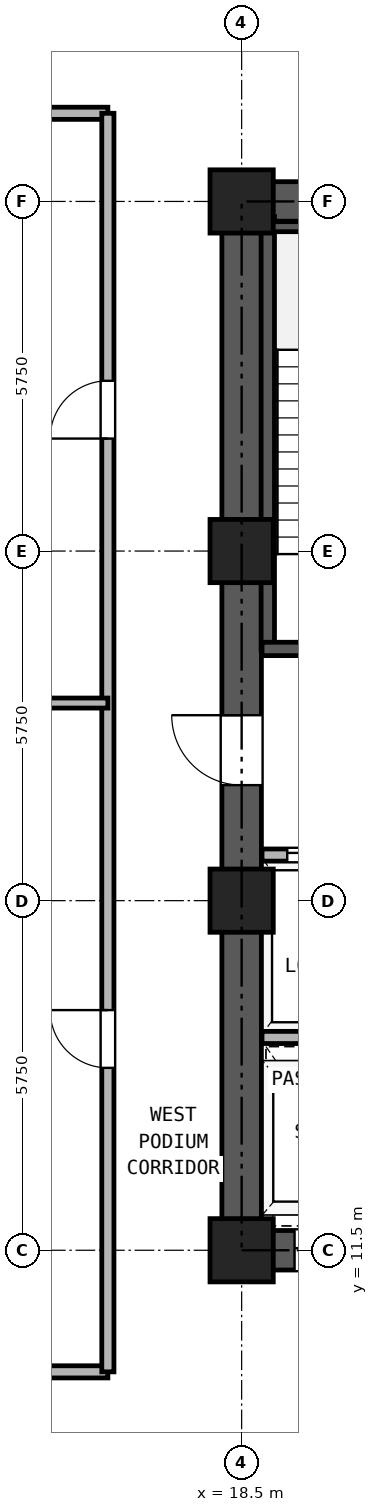
"""IFC4 building model, lengths in metres.
Left out: names, types, materials, properties, quantities, classifications, styles, units other than length and angle.
Written with IfcOpenShell. Run it as: python <this file> out.ifc"""

import sys

from ifc_helpers import new_model, si_unit, direction, frame, frame_2d, origin, origin_2d, place, context, subcontext, project, spatial, rectangle, hollow_rectangle, extrude, source, transform, mapped, element, fill, save


model = new_model("IFC4")
c1 = context("Model", 3, precision=1e-05, world=origin(), true_north=direction((0.0, 1.0)))
c2 = subcontext(c1, "Body", "Model", "MODEL_VIEW")
j1 = project(units=[si_unit("LENGTHUNIT", "METRE"), si_unit("PLANEANGLEUNIT", "RADIAN")], contexts=[c1])
p1 = place(None, origin())
s1 = spatial("IfcSite", under=j1, at=p1, CompositionType="ELEMENT")
p2 = place(p1, origin())
s2 = spatial("IfcBuilding", under=s1, at=p2, CompositionType="ELEMENT")
p3 = place(p2, frame((0.0, 0.0, 18.0)))
s3 = spatial("IfcBuildingStorey", under=s2, at=p3, CompositionType="ELEMENT", Elevation=18.0)
m1 = source(origin(), c2, "Body", "SweptSolid", [
    extrude(hollow_rectangle(XDim=1.04, YDim=1.04, WallThickness=0.065, at=origin_2d()), origin(), (0.0, 0.0, 1.0), 4.14),
])
for number, where, z_axis, x_axis in (
    (1, (18.5, 11.5, 0.0), (0.0, 0.0, 1.0), (1.0, 0.0, 0.0)),
    (2, (18.5, 17.25, 0.0), (0.0, 0.0, 1.0), (1.0, 0.0, 0.0)),
    (3, (18.5, 23.0, 0.0), (0.0, 0.0, 1.0), (1.0, 0.0, 0.0)),
    (4, (18.5, 28.75, 0.0), (0.0, 0.0, 1.0), (1.0, 0.0, 0.0)),
):
    element("IfcColumn", number, at=place(p3, frame(where, z_axis=z_axis, x_axis=x_axis)), inside=s3, PredefinedType="COLUMN", context=c2, shape_type="MappedRepresentation", body=[
        mapped(m1, transform((0.0, 0.0, 0.0), x_axis=(1.0, 0.0, 0.0), y_axis=(0.0, 1.0, 0.0), z_axis=(0.0, 0.0, 1.0), scale=1.0)),
    ])
p4 = place(p3, frame((18.175, 11.5, 0.0), z_axis=(0.0, 0.0, 1.0), x_axis=(1.0, 0.0, 0.0)))
e5 = element("IfcWall", 5, at=p4, inside=s3, PredefinedType="SHEAR", context=c2, shape_type="SweptSolid", body=[
    extrude(rectangle(XDim=10.65, YDim=0.65, at=frame_2d((5.325, 0.0))), origin(), (0.0, 0.0, 1.0), 4.14),
])
p5 = place(p4, frame((1.195, 0.0, 0.0)))
e6 = element("IfcOpeningElement", 6, at=p5, cuts=e5, PredefinedType="OPENING", context=c2, shape_type="SweptSolid", body=[
    extrude(rectangle(XDim=1.1, YDim=2.25, at=frame_2d((0.55, 1.125))), frame((0.0, 0.335, 0.0), z_axis=(0.0, -1.0, 0.0), x_axis=(1.0, 0.0, 0.0)), (0.0, 0.0, 1.0), 0.67),
])
p6 = place(p4, frame((3.495, 0.0, 0.0)))
e7 = element("IfcOpeningElement", 7, at=p6, cuts=e5, PredefinedType="OPENING", context=c2, shape_type="SweptSolid", body=[
    extrude(rectangle(XDim=1.1, YDim=2.25, at=frame_2d((0.55, 1.125))), frame((0.0, 0.335, 0.0), z_axis=(0.0, -1.0, 0.0), x_axis=(1.0, 0.0, 0.0)), (0.0, 0.0, 1.0), 0.67),
])
p7 = place(p4, frame((5.925, 0.0, 0.0)))
e8 = element("IfcOpeningElement", 8, at=p7, cuts=e5, PredefinedType="OPENING", context=c2, shape_type="SweptSolid", body=[
    extrude(rectangle(XDim=1.1, YDim=2.25, at=frame_2d((0.55, 1.125))), frame((0.0, 0.335, 0.0), z_axis=(0.0, -1.0, 0.0), x_axis=(1.0, 0.0, 0.0)), (0.0, 0.0, 1.0), 0.67),
])
p8 = place(p4, frame((8.325, 0.0, 0.0)))
e9 = element("IfcOpeningElement", 9, at=p8, cuts=e5, PredefinedType="OPENING", context=c2, shape_type="SweptSolid", body=[
    extrude(rectangle(XDim=1.1, YDim=2.25, at=frame_2d((0.55, 1.125))), frame((0.0, 0.335, 0.0), z_axis=(0.0, -1.0, 0.0), x_axis=(1.0, 0.0, 0.0)), (0.0, 0.0, 1.0), 0.67),
])
p9 = place(p3, frame((18.175, 28.75, 0.0), z_axis=(0.0, 0.0, 1.0), x_axis=(1.0, 0.0, 0.0)))
e10 = element("IfcWall", 10, at=p9, inside=s3, PredefinedType="SHEAR", context=c2, shape_type="SweptSolid", body=[
    extrude(rectangle(XDim=10.65, YDim=0.65, at=frame_2d((5.325, 0.0))), origin(), (0.0, 0.0, 1.0), 4.14),
])
p10 = place(p9, frame((4.205, 0.0, 0.0)))
e11 = element("IfcOpeningElement", 11, at=p10, cuts=e10, PredefinedType="OPENING", context=c2, shape_type="SweptSolid", body=[
    extrude(rectangle(XDim=0.9, YDim=2.05, at=frame_2d((0.45, 1.025))), frame((0.0, 0.335, 0.0), z_axis=(0.0, -1.0, 0.0), x_axis=(1.0, 0.0, 0.0)), (0.0, 0.0, 1.0), 0.67),
])
p11 = place(p9, frame((5.745, 0.0, 0.0)))
e12 = element("IfcOpeningElement", 12, at=p11, cuts=e10, PredefinedType="OPENING", context=c2, shape_type="SweptSolid", body=[
    extrude(rectangle(XDim=0.9, YDim=2.05, at=frame_2d((0.45, 1.025))), frame((0.0, 0.335, 0.0), z_axis=(0.0, -1.0, 0.0), x_axis=(1.0, 0.0, 0.0)), (0.0, 0.0, 1.0), 0.67),
])
p12 = place(p3, frame((18.5, 11.825, 0.0), z_axis=(0.0, 0.0, 1.0), x_axis=(0.0, 1.0, 0.0)))
e13 = element("IfcWall", 13, at=p12, inside=s3, PredefinedType="SHEAR", context=c2, shape_type="SweptSolid", body=[
    extrude(rectangle(XDim=16.6, YDim=0.65, at=frame_2d((8.3, 0.0))), origin(), (0.0, 0.0, 1.0), 4.14),
])
p13 = place(p12, frame((7.325, 0.0, 0.0)))
e14 = element("IfcOpeningElement", 14, at=p13, cuts=e13, PredefinedType="OPENING", context=c2, shape_type="SweptSolid", body=[
    extrude(rectangle(XDim=1.15, YDim=2.2, at=frame_2d((0.575, 1.1))), frame((0.0, 0.335, 0.0), z_axis=(0.0, -1.0, 0.0), x_axis=(1.0, 0.0, 0.0)), (0.0, 0.0, 1.0), 0.67),
])
p14 = place(p3, frame((18.93, 21.39, 0.0), z_axis=(0.0, 0.0, 1.0), x_axis=(0.0, 1.0, 0.0)))
e15 = element("IfcWall", 15, at=p14, inside=s3, PredefinedType="SOLIDWALL", context=c2, shape_type="SweptSolid", body=[
    extrude(rectangle(XDim=7.11, YDim=0.22, at=frame_2d((3.555, 0.0))), origin(), (0.0, 0.0, 1.0), 4.14),
])
p15 = place(p3, frame((18.835, 28.335, 0.0), z_axis=(0.0, 0.0, 1.0), x_axis=(1.0, 0.0, 0.0)))
e16 = element("IfcWall", 16, at=p15, inside=s3, PredefinedType="PARTITIONING", context=c2, shape_type="SweptSolid", body=[
    extrude(rectangle(XDim=3.275, YDim=0.165, at=frame_2d((1.638, 0.0))), origin(), (0.0, 0.0, 1.0), 4.14),
])
p16 = place(p3, frame((18.835, 21.39, 0.0), z_axis=(0.0, 0.0, 1.0), x_axis=(1.0, 0.0, 0.0)))
e17 = element("IfcWall", 17, at=p16, inside=s3, PredefinedType="SOLIDWALL", context=c2, shape_type="SweptSolid", body=[
    extrude(rectangle(XDim=6.295, YDim=0.22, at=frame_2d((3.147, 0.0))), origin(), (0.0, 0.0, 1.0), 4.14),
])
p17 = place(p16, frame((1.015, 0.0, 0.0)))
e18 = element("IfcOpeningElement", 18, at=p17, cuts=e17, PredefinedType="OPENING", context=c2, shape_type="SweptSolid", body=[
    extrude(rectangle(XDim=1.15, YDim=2.2, at=frame_2d((0.575, 1.1))), frame((0.0, 0.12, 0.0), z_axis=(0.0, -1.0, 0.0), x_axis=(1.0, 0.0, 0.0)), (0.0, 0.0, 1.0), 0.24),
])
p18 = place(p16, frame((4.745, 0.0, 0.0)))
e19 = element("IfcOpeningElement", 19, at=p18, cuts=e17, PredefinedType="OPENING", context=c2, shape_type="SweptSolid", body=[
    extrude(rectangle(XDim=1.1, YDim=2.25, at=frame_2d((0.55, 1.125))), frame((0.0, 0.12, 0.0), z_axis=(0.0, -1.0, 0.0), x_axis=(1.0, 0.0, 0.0)), (0.0, 0.0, 1.0), 0.24),
])
p19 = place(p3, frame((18.835, 18.0, 0.0), z_axis=(0.0, 0.0, 1.0), x_axis=(1.0, 0.0, 0.0)))
e20 = element("IfcWall", 20, at=p19, inside=s3, PredefinedType="PARTITIONING", context=c2, shape_type="SweptSolid", body=[
    extrude(rectangle(XDim=9.33, YDim=0.2, at=frame_2d((4.665, 0.0))), origin(), (0.0, 0.0, 1.0), 4.14),
])
p20 = place(p19, frame((0.415, 0.0, 0.0)))
e21 = element("IfcOpeningElement", 21, at=p20, cuts=e20, PredefinedType="OPENING", context=c2, shape_type="SweptSolid", body=[
    extrude(rectangle(XDim=1.3, YDim=2.3, at=frame_2d((0.65, 1.15))), frame((0.0, 0.11, 0.0), z_axis=(0.0, -1.0, 0.0), x_axis=(1.0, 0.0, 0.0)), (0.0, 0.0, 1.0), 0.22),
])
p21 = place(p19, frame((2.515, 0.0, 0.0)))
e22 = element("IfcOpeningElement", 22, at=p21, cuts=e20, PredefinedType="OPENING", context=c2, shape_type="SweptSolid", body=[
    extrude(rectangle(XDim=1.3, YDim=2.3, at=frame_2d((0.65, 1.15))), frame((0.0, 0.11, 0.0), z_axis=(0.0, -1.0, 0.0), x_axis=(1.0, 0.0, 0.0)), (0.0, 0.0, 1.0), 0.22),
])
p22 = place(p19, frame((7.015, 0.0, 0.0)))
e23 = element("IfcOpeningElement", 23, at=p22, cuts=e20, PredefinedType="OPENING", context=c2, shape_type="SweptSolid", body=[
    extrude(rectangle(XDim=1.0, YDim=2.15, at=frame_2d((0.5, 1.075))), frame((0.0, 0.11, 0.0), z_axis=(0.0, -1.0, 0.0), x_axis=(1.0, 0.0, 0.0)), (0.0, 0.0, 1.0), 0.22),
])
p23 = place(p3, frame((18.835, 15.0, 0.0), z_axis=(0.0, 0.0, 1.0), x_axis=(1.0, 0.0, 0.0)))
e24 = element("IfcWall", 24, at=p23, inside=s3, PredefinedType="PARTITIONING", context=c2, shape_type="SweptSolid", body=[
    extrude(rectangle(XDim=9.33, YDim=0.2, at=frame_2d((4.665, 0.0))), origin(), (0.0, 0.0, 1.0), 4.14),
])
for number, where, z_axis, x_axis in (
    (25, (10.5, 9.5, 0.0), (0.0, 0.0, 1.0), (1.0, 0.0, 0.0)),
    (26, (10.5, 30.2, 0.0), (0.0, 0.0, 1.0), (1.0, 0.0, 0.0)),
):
    element("IfcWall", number, at=place(p3, frame(where, z_axis=z_axis, x_axis=x_axis)), inside=s3, PredefinedType="PARTITIONING", context=c2, shape_type="SweptSolid", body=[
        extrude(rectangle(XDim=5.8, YDim=0.2, at=frame_2d((2.9, 0.0))), origin(), (0.0, 0.0, 1.0), 4.14),
    ])
p24 = place(p3, frame((16.3, 9.5, 0.0), z_axis=(0.0, 0.0, 1.0), x_axis=(0.0, 1.0, 0.0)))
e27 = element("IfcWall", 27, at=p24, inside=s3, PredefinedType="PARTITIONING", context=c2, shape_type="SweptSolid", body=[
    extrude(rectangle(XDim=20.7, YDim=0.2, at=frame_2d((10.35, 0.0))), origin(), (0.0, 0.0, 1.0), 4.14),
])
p25 = place(p24, frame((5.0, 0.0, 0.0)))
e28 = element("IfcOpeningElement", 28, at=p25, cuts=e27, PredefinedType="OPENING", context=c2, shape_type="SweptSolid", body=[
    extrude(rectangle(XDim=0.95, YDim=2.15, at=frame_2d((0.475, 1.075))), frame((0.0, 0.11, 0.0), z_axis=(0.0, -1.0, 0.0), x_axis=(1.0, 0.0, 0.0)), (0.0, 0.0, 1.0), 0.22),
])
p26 = place(p24, frame((15.35, 0.0, 0.0)))
e29 = element("IfcOpeningElement", 29, at=p26, cuts=e27, PredefinedType="OPENING", context=c2, shape_type="SweptSolid", body=[
    extrude(rectangle(XDim=0.95, YDim=2.15, at=frame_2d((0.475, 1.075))), frame((0.0, 0.11, 0.0), z_axis=(0.0, -1.0, 0.0), x_axis=(1.0, 0.0, 0.0)), (0.0, 0.0, 1.0), 0.22),
])
p27 = place(p3, frame((0.25, 20.5, 0.0), z_axis=(0.0, 0.0, 1.0), x_axis=(1.0, 0.0, 0.0)))
e30 = element("IfcWall", 30, at=p27, inside=s3, PredefinedType="PARTITIONING", context=c2, shape_type="SweptSolid", body=[
    extrude(rectangle(XDim=16.05, YDim=0.165, at=frame_2d((8.025, 0.0))), origin(), (0.0, 0.0, 1.0), 4.14),
])
p28 = place(p20, origin())
e31 = element("IfcDoor", 31, at=p28, inside=s3, OperationType="DOUBLE_DOOR_SLIDING", PredefinedType="DOOR", context=c2, shape_type="SweptSolid", body=[
    extrude(rectangle(XDim=1.3, YDim=2.3, at=frame_2d((0.65, 1.15))), frame((0.0, 0.025, 0.0), z_axis=(0.0, -1.0, 0.0), x_axis=(1.0, 0.0, 0.0)), (0.0, 0.0, 1.0), 0.05),
])
fill(e21, e31)
p29 = place(p13, frame((1.15, 0.0, 0.0), z_axis=(0.0, 0.0, 1.0), x_axis=(-1.0, 0.0, 0.0)))
e32 = element("IfcDoor", 32, at=p29, inside=s3, OperationType="SINGLE_SWING_RIGHT", PredefinedType="DOOR", context=c2, shape_type="SweptSolid", body=[
    extrude(rectangle(XDim=1.15, YDim=2.2, at=frame_2d((0.575, 1.1))), frame((0.0, 0.025, 0.0), z_axis=(0.0, -1.0, 0.0), x_axis=(1.0, 0.0, 0.0)), (0.0, 0.0, 1.0), 0.05),
])
fill(e14, e32)
p30 = place(p5, frame((1.1, 0.0, 0.0), z_axis=(0.0, 0.0, 1.0), x_axis=(-1.0, 0.0, 0.0)))
e33 = element("IfcDoor", 33, at=p30, inside=s3, OperationType="DOUBLE_DOOR_SLIDING", PredefinedType="DOOR", context=c2, shape_type="SweptSolid", body=[
    extrude(rectangle(XDim=1.1, YDim=2.25, at=frame_2d((0.55, 1.125))), frame((0.0, 0.025, 0.0), z_axis=(0.0, -1.0, 0.0), x_axis=(1.0, 0.0, 0.0)), (0.0, 0.0, 1.0), 0.05),
])
fill(e6, e33)
p31 = place(p25, frame((0.95, 0.0, 0.0), z_axis=(0.0, 0.0, 1.0), x_axis=(-1.0, 0.0, 0.0)))
e34 = element("IfcDoor", 34, at=p31, inside=s3, OperationType="SINGLE_SWING_RIGHT", PredefinedType="DOOR", context=c2, shape_type="SweptSolid", body=[
    extrude(rectangle(XDim=0.95, YDim=2.15, at=frame_2d((0.475, 1.075))), frame((0.0, 0.025, 0.0), z_axis=(0.0, -1.0, 0.0), x_axis=(1.0, 0.0, 0.0)), (0.0, 0.0, 1.0), 0.05),
])
fill(e28, e34)
p32 = place(p26, frame((0.95, 0.0, 0.0), z_axis=(0.0, 0.0, 1.0), x_axis=(-1.0, 0.0, 0.0)))
e35 = element("IfcDoor", 35, at=p32, inside=s3, OperationType="SINGLE_SWING_LEFT", PredefinedType="DOOR", context=c2, shape_type="SweptSolid", body=[
    extrude(rectangle(XDim=0.95, YDim=2.15, at=frame_2d((0.475, 1.075))), frame((0.0, 0.025, 0.0), z_axis=(0.0, -1.0, 0.0), x_axis=(1.0, 0.0, 0.0)), (0.0, 0.0, 1.0), 0.05),
])
fill(e29, e35)
save(model, sys.argv[1])
